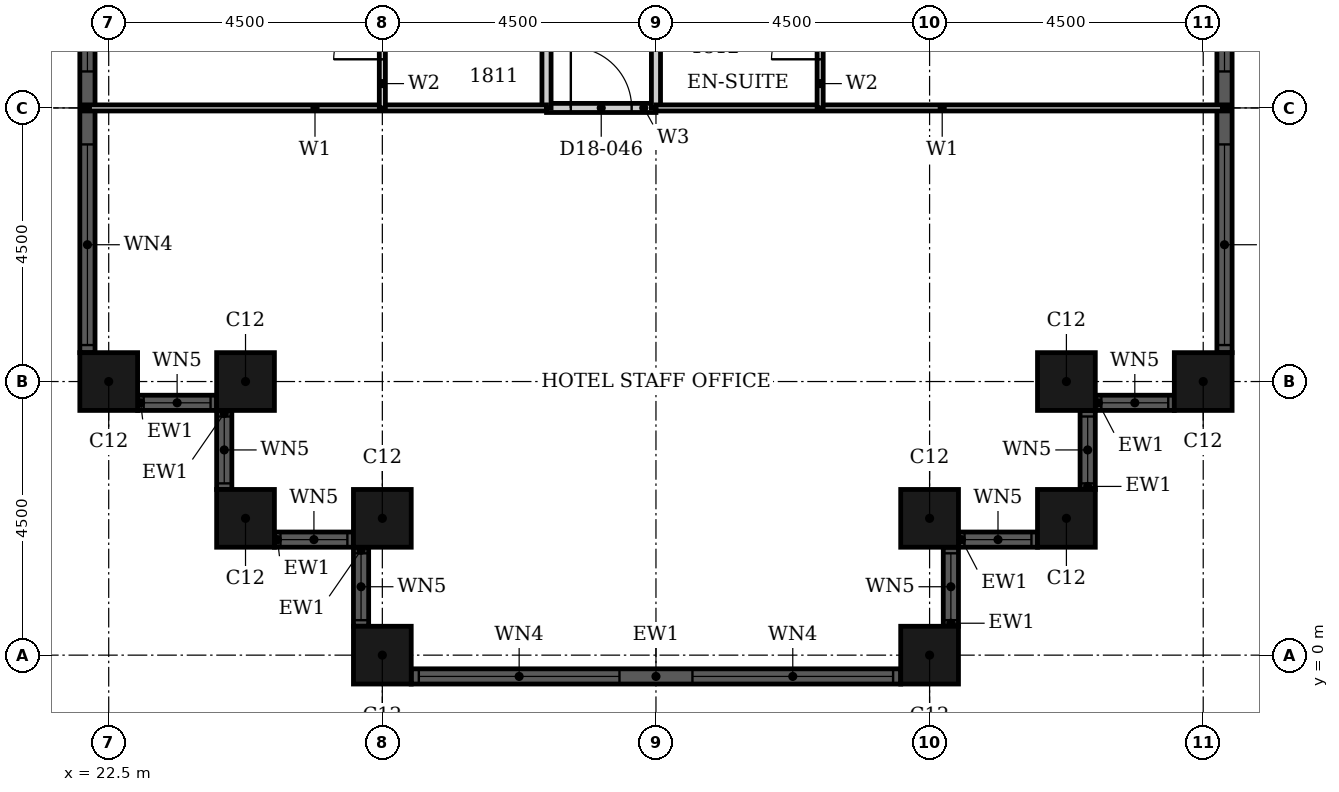
"""IFC4 building model, lengths in metres.
Left out: names, types, materials, properties, quantities, classifications, styles, units other than length and angle.
Written with IfcOpenShell. Run it as: python <this file> out.ifc"""

import sys

from ifc_helpers import new_model, si_unit, direction, frame, frame_2d, origin, origin_2d, place, context, subcontext, project, spatial, rectangle, hollow_rectangle, extrude, element, fill, save


model = new_model("IFC4")
c1 = context("Model", 3, precision=1e-05, world=origin(), true_north=direction((0.0, 1.0)))
c2 = subcontext(c1, "Body", "Model", "MODEL_VIEW")
j1 = project(units=[si_unit("LENGTHUNIT", "METRE"), si_unit("PLANEANGLEUNIT", "RADIAN")], contexts=[c1])
p1 = place(None, origin())
s1 = spatial("IfcSite", under=j1, at=p1, CompositionType="ELEMENT")
p2 = place(p1, origin())
s2 = spatial("IfcBuilding", under=s1, at=p2, CompositionType="ELEMENT")
p3 = place(p2, frame((0.0, 0.0, 78.0)))
s3 = spatial("IfcBuildingStorey", under=s2, at=p3, CompositionType="ELEMENT", Elevation=78.0)
for number, where, z_axis, x_axis in (
    (1, (22.5, 4.5, 0.0), (0.0, 0.0, 1.0), (1.0, 0.0, 0.0)),
    (2, (24.75, 4.5, 0.0), (0.0, 0.0, 1.0), (1.0, 0.0, 0.0)),
    (3, (24.75, 2.25, 0.0), (0.0, 0.0, 1.0), (1.0, 0.0, 0.0)),
    (4, (27.0, 2.25, 0.0), (0.0, 0.0, 1.0), (1.0, 0.0, 0.0)),
    (5, (27.0, 0.0, 0.0), (0.0, 0.0, 1.0), (1.0, 0.0, 0.0)),
    (6, (36.0, 0.0, 0.0), (0.0, 0.0, 1.0), (1.0, 0.0, 0.0)),
    (7, (36.0, 2.25, 0.0), (0.0, 0.0, 1.0), (1.0, 0.0, 0.0)),
    (8, (38.25, 2.25, 0.0), (0.0, 0.0, 1.0), (1.0, 0.0, 0.0)),
    (9, (38.25, 4.5, 0.0), (0.0, 0.0, 1.0), (1.0, 0.0, 0.0)),
    (10, (40.5, 4.5, 0.0), (0.0, 0.0, 1.0), (1.0, 0.0, 0.0)),
):
    element("IfcColumn", number, at=place(p3, frame(where, z_axis=z_axis, x_axis=x_axis)), inside=s3, PredefinedType="COLUMN", context=c2, shape_type="SweptSolid", body=[
        extrude(hollow_rectangle(XDim=0.95, YDim=0.95, WallThickness=0.03, at=origin_2d()), origin(), (0.0, 0.0, 1.0), 3.6),
    ])
p4 = place(p3, frame((22.975, 4.15, 0.0), z_axis=(0.0, 0.0, 1.0), x_axis=(1.0, 0.0, 0.0)))
e11 = element("IfcWall", 11, at=p4, inside=s3, PredefinedType="SOLIDWALL", context=c2, shape_type="SweptSolid", body=[
    extrude(rectangle(XDim=1.3, YDim=0.25, at=frame_2d((0.65, 0.0))), origin(), (0.0, 0.0, 1.0), 3.6),
])
p5 = place(p4, frame((0.1, 0.0, 0.9)))
e12 = element("IfcOpeningElement", 12, at=p5, cuts=e11, PredefinedType="OPENING", context=c2, shape_type="SweptSolid", body=[
    extrude(rectangle(XDim=1.1, YDim=2.08, at=frame_2d((0.55, 1.04))), frame((0.0, 0.135, 0.0), z_axis=(0.0, -1.0, 0.0), x_axis=(1.0, 0.0, 0.0)), (0.0, 0.0, 1.0), 0.27),
])
p6 = place(p3, frame((24.4, 4.025, 0.0), z_axis=(0.0, 0.0, 1.0), x_axis=(0.0, -1.0, 0.0)))
e13 = element("IfcWall", 13, at=p6, inside=s3, PredefinedType="SOLIDWALL", context=c2, shape_type="SweptSolid", body=[
    extrude(rectangle(XDim=1.3, YDim=0.25, at=frame_2d((0.65, 0.0))), origin(), (0.0, 0.0, 1.0), 3.6),
])
p7 = place(p6, frame((0.1, 0.0, 0.9)))
e14 = element("IfcOpeningElement", 14, at=p7, cuts=e13, PredefinedType="OPENING", context=c2, shape_type="SweptSolid", body=[
    extrude(rectangle(XDim=1.1, YDim=2.08, at=frame_2d((0.55, 1.04))), frame((0.0, 0.135, 0.0), z_axis=(0.0, -1.0, 0.0), x_axis=(1.0, 0.0, 0.0)), (0.0, 0.0, 1.0), 0.27),
])
p8 = place(p3, frame((25.225, 1.9, 0.0), z_axis=(0.0, 0.0, 1.0), x_axis=(1.0, 0.0, 0.0)))
e15 = element("IfcWall", 15, at=p8, inside=s3, PredefinedType="SOLIDWALL", context=c2, shape_type="SweptSolid", body=[
    extrude(rectangle(XDim=1.3, YDim=0.25, at=frame_2d((0.65, 0.0))), origin(), (0.0, 0.0, 1.0), 3.6),
])
p9 = place(p8, frame((0.1, 0.0, 0.9)))
e16 = element("IfcOpeningElement", 16, at=p9, cuts=e15, PredefinedType="OPENING", context=c2, shape_type="SweptSolid", body=[
    extrude(rectangle(XDim=1.1, YDim=2.08, at=frame_2d((0.55, 1.04))), frame((0.0, 0.135, 0.0), z_axis=(0.0, -1.0, 0.0), x_axis=(1.0, 0.0, 0.0)), (0.0, 0.0, 1.0), 0.27),
])
p10 = place(p3, frame((26.65, 1.775, 0.0), z_axis=(0.0, 0.0, 1.0), x_axis=(0.0, -1.0, 0.0)))
e17 = element("IfcWall", 17, at=p10, inside=s3, PredefinedType="SOLIDWALL", context=c2, shape_type="SweptSolid", body=[
    extrude(rectangle(XDim=1.3, YDim=0.25, at=frame_2d((0.65, 0.0))), origin(), (0.0, 0.0, 1.0), 3.6),
])
p11 = place(p10, frame((0.1, 0.0, 0.9)))
e18 = element("IfcOpeningElement", 18, at=p11, cuts=e17, PredefinedType="OPENING", context=c2, shape_type="SweptSolid", body=[
    extrude(rectangle(XDim=1.1, YDim=2.08, at=frame_2d((0.55, 1.04))), frame((0.0, 0.135, 0.0), z_axis=(0.0, -1.0, 0.0), x_axis=(1.0, 0.0, 0.0)), (0.0, 0.0, 1.0), 0.27),
])
p12 = place(p3, frame((27.475, -0.35, 0.0), z_axis=(0.0, 0.0, 1.0), x_axis=(1.0, 0.0, 0.0)))
e19 = element("IfcWall", 19, at=p12, inside=s3, PredefinedType="SOLIDWALL", context=c2, shape_type="SweptSolid", body=[
    extrude(rectangle(XDim=8.05, YDim=0.25, at=frame_2d((4.025, 0.0))), origin(), (0.0, 0.0, 1.0), 3.6),
])
p13 = place(p12, frame((0.125, 0.0, 0.9)))
e20 = element("IfcOpeningElement", 20, at=p13, cuts=e19, PredefinedType="OPENING", context=c2, shape_type="SweptSolid", body=[
    extrude(rectangle(XDim=3.3, YDim=2.08, at=frame_2d((1.65, 1.04))), frame((0.0, 0.135, 0.0), z_axis=(0.0, -1.0, 0.0), x_axis=(1.0, 0.0, 0.0)), (0.0, 0.0, 1.0), 0.27),
])
p14 = place(p12, frame((4.625, 0.0, 0.9)))
e21 = element("IfcOpeningElement", 21, at=p14, cuts=e19, PredefinedType="OPENING", context=c2, shape_type="SweptSolid", body=[
    extrude(rectangle(XDim=3.3, YDim=2.08, at=frame_2d((1.65, 1.04))), frame((0.0, 0.135, 0.0), z_axis=(0.0, -1.0, 0.0), x_axis=(1.0, 0.0, 0.0)), (0.0, 0.0, 1.0), 0.27),
])
p15 = place(p3, frame((36.35, 0.475, 0.0), z_axis=(0.0, 0.0, 1.0), x_axis=(0.0, 1.0, 0.0)))
e22 = element("IfcWall", 22, at=p15, inside=s3, PredefinedType="SOLIDWALL", context=c2, shape_type="SweptSolid", body=[
    extrude(rectangle(XDim=1.3, YDim=0.25, at=frame_2d((0.65, 0.0))), origin(), (0.0, 0.0, 1.0), 3.6),
])
p16 = place(p15, frame((0.1, 0.0, 0.9)))
e23 = element("IfcOpeningElement", 23, at=p16, cuts=e22, PredefinedType="OPENING", context=c2, shape_type="SweptSolid", body=[
    extrude(rectangle(XDim=1.1, YDim=2.08, at=frame_2d((0.55, 1.04))), frame((0.0, 0.135, 0.0), z_axis=(0.0, -1.0, 0.0), x_axis=(1.0, 0.0, 0.0)), (0.0, 0.0, 1.0), 0.27),
])
p17 = place(p3, frame((36.475, 1.9, 0.0), z_axis=(0.0, 0.0, 1.0), x_axis=(1.0, 0.0, 0.0)))
e24 = element("IfcWall", 24, at=p17, inside=s3, PredefinedType="SOLIDWALL", context=c2, shape_type="SweptSolid", body=[
    extrude(rectangle(XDim=1.3, YDim=0.25, at=frame_2d((0.65, 0.0))), origin(), (0.0, 0.0, 1.0), 3.6),
])
p18 = place(p17, frame((0.1, 0.0, 0.9)))
e25 = element("IfcOpeningElement", 25, at=p18, cuts=e24, PredefinedType="OPENING", context=c2, shape_type="SweptSolid", body=[
    extrude(rectangle(XDim=1.1, YDim=2.08, at=frame_2d((0.55, 1.04))), frame((0.0, 0.135, 0.0), z_axis=(0.0, -1.0, 0.0), x_axis=(1.0, 0.0, 0.0)), (0.0, 0.0, 1.0), 0.27),
])
p19 = place(p3, frame((38.6, 2.725, 0.0), z_axis=(0.0, 0.0, 1.0), x_axis=(0.0, 1.0, 0.0)))
e26 = element("IfcWall", 26, at=p19, inside=s3, PredefinedType="SOLIDWALL", context=c2, shape_type="SweptSolid", body=[
    extrude(rectangle(XDim=1.3, YDim=0.25, at=frame_2d((0.65, 0.0))), origin(), (0.0, 0.0, 1.0), 3.6),
])
p20 = place(p19, frame((0.1, 0.0, 0.9)))
e27 = element("IfcOpeningElement", 27, at=p20, cuts=e26, PredefinedType="OPENING", context=c2, shape_type="SweptSolid", body=[
    extrude(rectangle(XDim=1.1, YDim=2.08, at=frame_2d((0.55, 1.04))), frame((0.0, 0.135, 0.0), z_axis=(0.0, -1.0, 0.0), x_axis=(1.0, 0.0, 0.0)), (0.0, 0.0, 1.0), 0.27),
])
p21 = place(p3, frame((38.725, 4.15, 0.0), z_axis=(0.0, 0.0, 1.0), x_axis=(1.0, 0.0, 0.0)))
e28 = element("IfcWall", 28, at=p21, inside=s3, PredefinedType="SOLIDWALL", context=c2, shape_type="SweptSolid", body=[
    extrude(rectangle(XDim=1.3, YDim=0.25, at=frame_2d((0.65, 0.0))), origin(), (0.0, 0.0, 1.0), 3.6),
])
p22 = place(p21, frame((0.1, 0.0, 0.9)))
e29 = element("IfcOpeningElement", 29, at=p22, cuts=e28, PredefinedType="OPENING", context=c2, shape_type="SweptSolid", body=[
    extrude(rectangle(XDim=1.1, YDim=2.08, at=frame_2d((0.55, 1.04))), frame((0.0, 0.135, 0.0), z_axis=(0.0, -1.0, 0.0), x_axis=(1.0, 0.0, 0.0)), (0.0, 0.0, 1.0), 0.27),
])
p23 = place(p3, frame((40.85, 4.975, 0.0), z_axis=(0.0, 0.0, 1.0), x_axis=(0.0, 1.0, 0.0)))
e30 = element("IfcWall", 30, at=p23, inside=s3, PredefinedType="SOLIDWALL", context=c2, shape_type="SweptSolid", body=[
    extrude(rectangle(XDim=8.05, YDim=0.25, at=frame_2d((4.025, 0.0))), origin(), (0.0, 0.0, 1.0), 3.6),
])
p24 = place(p23, frame((0.125, 0.0, 0.9)))
e31 = element("IfcOpeningElement", 31, at=p24, cuts=e30, PredefinedType="OPENING", context=c2, shape_type="SweptSolid", body=[
    extrude(rectangle(XDim=3.3, YDim=2.08, at=frame_2d((1.65, 1.04))), frame((0.0, 0.135, 0.0), z_axis=(0.0, -1.0, 0.0), x_axis=(1.0, 0.0, 0.0)), (0.0, 0.0, 1.0), 0.27),
])
p25 = place(p23, frame((4.625, 0.0, 0.9)))
e32 = element("IfcOpeningElement", 32, at=p25, cuts=e30, PredefinedType="OPENING", context=c2, shape_type="SweptSolid", body=[
    extrude(rectangle(XDim=3.3, YDim=2.08, at=frame_2d((1.65, 1.04))), frame((0.0, 0.135, 0.0), z_axis=(0.0, -1.0, 0.0), x_axis=(1.0, 0.0, 0.0)), (0.0, 0.0, 1.0), 0.27),
])
p26 = place(p3, frame((22.15, 13.025, 0.0), z_axis=(0.0, 0.0, 1.0), x_axis=(0.0, -1.0, 0.0)))
e33 = element("IfcWall", 33, at=p26, inside=s3, PredefinedType="SOLIDWALL", context=c2, shape_type="SweptSolid", body=[
    extrude(rectangle(XDim=8.05, YDim=0.25, at=frame_2d((4.025, 0.0))), origin(), (0.0, 0.0, 1.0), 3.6),
])
p27 = place(p26, frame((0.125, 0.0, 0.9)))
e34 = element("IfcOpeningElement", 34, at=p27, cuts=e33, PredefinedType="OPENING", context=c2, shape_type="SweptSolid", body=[
    extrude(rectangle(XDim=3.3, YDim=2.08, at=frame_2d((1.65, 1.04))), frame((0.0, 0.135, 0.0), z_axis=(0.0, -1.0, 0.0), x_axis=(1.0, 0.0, 0.0)), (0.0, 0.0, 1.0), 0.27),
])
p28 = place(p26, frame((4.625, 0.0, 0.9)))
e35 = element("IfcOpeningElement", 35, at=p28, cuts=e33, PredefinedType="OPENING", context=c2, shape_type="SweptSolid", body=[
    extrude(rectangle(XDim=3.3, YDim=2.08, at=frame_2d((1.65, 1.04))), frame((0.0, 0.135, 0.0), z_axis=(0.0, -1.0, 0.0), x_axis=(1.0, 0.0, 0.0)), (0.0, 0.0, 1.0), 0.27),
])
p29 = place(p3, frame((29.7, 9.0, 0.0), z_axis=(0.0, 0.0, 1.0), x_axis=(1.0, 0.0, 0.0)))
e36 = element("IfcWall", 36, at=p29, inside=s3, PredefinedType="PARTITIONING", context=c2, shape_type="SweptSolid", body=[
    extrude(rectangle(XDim=1.8, YDim=0.15, at=frame_2d((0.9, 0.0))), origin(), (0.0, 0.0, 1.0), 3.3),
])
p30 = place(p29, frame((0.4, 0.0, 0.0)))
e37 = element("IfcOpeningElement", 37, at=p30, cuts=e36, PredefinedType="OPENING", context=c2, shape_type="SweptSolid", body=[
    extrude(rectangle(XDim=1.0, YDim=2.1, at=frame_2d((0.5, 1.05))), frame((0.0, 0.085, 0.0), z_axis=(0.0, -1.0, 0.0), x_axis=(1.0, 0.0, 0.0)), (0.0, 0.0, 1.0), 0.17),
])
p31 = place(p3, frame((29.7, 9.0, 0.0), z_axis=(0.0, 0.0, 1.0), x_axis=(0.0, 1.0, 0.0)))
e38 = element("IfcWall", 38, at=p31, inside=s3, PredefinedType="PARTITIONING", context=c2, shape_type="SweptSolid", body=[
    extrude(rectangle(XDim=11.7, YDim=0.15, at=frame_2d((5.85, 0.0))), origin(), (0.0, 0.0, 1.0), 3.3),
])
p32 = place(p31, frame((2.95, 0.0, 0.0)))
e39 = element("IfcOpeningElement", 39, at=p32, cuts=e38, PredefinedType="OPENING", context=c2, shape_type="SweptSolid", body=[
    extrude(rectangle(XDim=1.0, YDim=2.1, at=frame_2d((0.5, 1.05))), frame((0.0, 0.085, 0.0), z_axis=(0.0, -1.0, 0.0), x_axis=(1.0, 0.0, 0.0)), (0.0, 0.0, 1.0), 0.17),
])
p33 = place(p3, frame((31.5, 9.0, 0.0), z_axis=(0.0, 0.0, 1.0), x_axis=(0.0, 1.0, 0.0)))
e40 = element("IfcWall", 40, at=p33, inside=s3, PredefinedType="PARTITIONING", context=c2, shape_type="SweptSolid", body=[
    extrude(rectangle(XDim=11.7, YDim=0.15, at=frame_2d((5.85, 0.0))), origin(), (0.0, 0.0, 1.0), 2.58),
])
p34 = place(p33, frame((2.95, 0.0, 0.0)))
e41 = element("IfcOpeningElement", 41, at=p34, cuts=e40, PredefinedType="OPENING", context=c2, shape_type="SweptSolid", body=[
    extrude(rectangle(XDim=1.0, YDim=2.1, at=frame_2d((0.5, 1.05))), frame((0.0, 0.085, 0.0), z_axis=(0.0, -1.0, 0.0), x_axis=(1.0, 0.0, 0.0)), (0.0, 0.0, 1.0), 0.17),
])
p35 = place(p3, frame((31.5, 9.0, 0.0), z_axis=(0.0, 0.0, 1.0), x_axis=(1.0, 0.0, 0.0)))
e42 = element("IfcWall", 42, at=p35, inside=s3, PredefinedType="PARTITIONING", context=c2, shape_type="SweptSolid", body=[
    extrude(rectangle(XDim=9.415, YDim=0.1, at=frame_2d((4.708, 0.0))), origin(), (0.0, 0.0, 1.0), 3.3),
])
p36 = place(p3, frame((22.085, 9.0, 0.0), z_axis=(0.0, 0.0, 1.0), x_axis=(1.0, 0.0, 0.0)))
e43 = element("IfcWall", 43, at=p36, inside=s3, PredefinedType="PARTITIONING", context=c2, shape_type="SweptSolid", body=[
    extrude(rectangle(XDim=7.615, YDim=0.1, at=frame_2d((3.808, 0.0))), origin(), (0.0, 0.0, 1.0), 3.3),
])
p37 = place(p3, frame((27.0, 9.0, 0.0), z_axis=(0.0, 0.0, 1.0), x_axis=(0.0, 1.0, 0.0)))
e44 = element("IfcWall", 44, at=p37, inside=s3, PredefinedType="PARTITIONING", context=c2, shape_type="SweptSolid", body=[
    extrude(rectangle(XDim=2.4, YDim=0.1, at=frame_2d((1.2, 0.0))), origin(), (0.0, 0.0, 1.0), 2.58),
])
p38 = place(p37, frame((0.8, 0.0, 0.0)))
e45 = element("IfcOpeningElement", 45, at=p38, cuts=e44, PredefinedType="OPENING", context=c2, shape_type="SweptSolid", body=[
    extrude(rectangle(XDim=0.8, YDim=2.1, at=frame_2d((0.4, 1.05))), frame((0.0, 0.06, 0.0), z_axis=(0.0, -1.0, 0.0), x_axis=(1.0, 0.0, 0.0)), (0.0, 0.0, 1.0), 0.12),
])
p39 = place(p3, frame((34.2, 9.0, 0.0), z_axis=(0.0, 0.0, 1.0), x_axis=(0.0, 1.0, 0.0)))
e46 = element("IfcWall", 46, at=p39, inside=s3, PredefinedType="PARTITIONING", context=c2, shape_type="SweptSolid", body=[
    extrude(rectangle(XDim=2.4, YDim=0.1, at=frame_2d((1.2, 0.0))), origin(), (0.0, 0.0, 1.0), 3.3),
])
p40 = place(p39, frame((0.8, 0.0, 0.0)))
e47 = element("IfcOpeningElement", 47, at=p40, cuts=e46, PredefinedType="OPENING", context=c2, shape_type="SweptSolid", body=[
    extrude(rectangle(XDim=0.8, YDim=2.1, at=frame_2d((0.4, 1.05))), frame((0.0, 0.06, 0.0), z_axis=(0.0, -1.0, 0.0), x_axis=(1.0, 0.0, 0.0)), (0.0, 0.0, 1.0), 0.12),
])
p41 = place(p5, origin())
e48 = element("IfcWindow", 48, at=p41, inside=s3, PartitioningType="SINGLE_PANEL", PredefinedType="WINDOW", context=c2, shape_type="SweptSolid", body=[
    extrude(rectangle(XDim=1.1, YDim=2.08, at=frame_2d((0.55, 1.04))), frame((0.0, 0.03, 0.0), z_axis=(0.0, -1.0, 0.0), x_axis=(1.0, 0.0, 0.0)), (0.0, 0.0, 1.0), 0.06),
])
fill(e12, e48)
p42 = place(p7, origin())
e49 = element("IfcWindow", 49, at=p42, inside=s3, PartitioningType="SINGLE_PANEL", PredefinedType="WINDOW", context=c2, shape_type="SweptSolid", body=[
    extrude(rectangle(XDim=1.1, YDim=2.08, at=frame_2d((0.55, 1.04))), frame((0.0, 0.03, 0.0), z_axis=(0.0, -1.0, 0.0), x_axis=(1.0, 0.0, 0.0)), (0.0, 0.0, 1.0), 0.06),
])
fill(e14, e49)
p43 = place(p9, origin())
e50 = element("IfcWindow", 50, at=p43, inside=s3, PartitioningType="SINGLE_PANEL", PredefinedType="WINDOW", context=c2, shape_type="SweptSolid", body=[
    extrude(rectangle(XDim=1.1, YDim=2.08, at=frame_2d((0.55, 1.04))), frame((0.0, 0.03, 0.0), z_axis=(0.0, -1.0, 0.0), x_axis=(1.0, 0.0, 0.0)), (0.0, 0.0, 1.0), 0.06),
])
fill(e16, e50)
p44 = place(p11, origin())
e51 = element("IfcWindow", 51, at=p44, inside=s3, PartitioningType="SINGLE_PANEL", PredefinedType="WINDOW", context=c2, shape_type="SweptSolid", body=[
    extrude(rectangle(XDim=1.1, YDim=2.08, at=frame_2d((0.55, 1.04))), frame((0.0, 0.03, 0.0), z_axis=(0.0, -1.0, 0.0), x_axis=(1.0, 0.0, 0.0)), (0.0, 0.0, 1.0), 0.06),
])
fill(e18, e51)
p45 = place(p13, origin())
e52 = element("IfcWindow", 52, at=p45, inside=s3, PartitioningType="SINGLE_PANEL", PredefinedType="WINDOW", context=c2, shape_type="SweptSolid", body=[
    extrude(rectangle(XDim=3.3, YDim=2.08, at=frame_2d((1.65, 1.04))), frame((0.0, 0.03, 0.0), z_axis=(0.0, -1.0, 0.0), x_axis=(1.0, 0.0, 0.0)), (0.0, 0.0, 1.0), 0.06),
])
fill(e20, e52)
p46 = place(p14, origin())
e53 = element("IfcWindow", 53, at=p46, inside=s3, PartitioningType="SINGLE_PANEL", PredefinedType="WINDOW", context=c2, shape_type="SweptSolid", body=[
    extrude(rectangle(XDim=3.3, YDim=2.08, at=frame_2d((1.65, 1.04))), frame((0.0, 0.03, 0.0), z_axis=(0.0, -1.0, 0.0), x_axis=(1.0, 0.0, 0.0)), (0.0, 0.0, 1.0), 0.06),
])
fill(e21, e53)
p47 = place(p16, origin())
e54 = element("IfcWindow", 54, at=p47, inside=s3, PartitioningType="SINGLE_PANEL", PredefinedType="WINDOW", context=c2, shape_type="SweptSolid", body=[
    extrude(rectangle(XDim=1.1, YDim=2.08, at=frame_2d((0.55, 1.04))), frame((0.0, 0.03, 0.0), z_axis=(0.0, -1.0, 0.0), x_axis=(1.0, 0.0, 0.0)), (0.0, 0.0, 1.0), 0.06),
])
fill(e23, e54)
p48 = place(p18, origin())
e55 = element("IfcWindow", 55, at=p48, inside=s3, PartitioningType="SINGLE_PANEL", PredefinedType="WINDOW", context=c2, shape_type="SweptSolid", body=[
    extrude(rectangle(XDim=1.1, YDim=2.08, at=frame_2d((0.55, 1.04))), frame((0.0, 0.03, 0.0), z_axis=(0.0, -1.0, 0.0), x_axis=(1.0, 0.0, 0.0)), (0.0, 0.0, 1.0), 0.06),
])
fill(e25, e55)
p49 = place(p20, origin())
e56 = element("IfcWindow", 56, at=p49, inside=s3, PartitioningType="SINGLE_PANEL", PredefinedType="WINDOW", context=c2, shape_type="SweptSolid", body=[
    extrude(rectangle(XDim=1.1, YDim=2.08, at=frame_2d((0.55, 1.04))), frame((0.0, 0.03, 0.0), z_axis=(0.0, -1.0, 0.0), x_axis=(1.0, 0.0, 0.0)), (0.0, 0.0, 1.0), 0.06),
])
fill(e27, e56)
p50 = place(p22, origin())
e57 = element("IfcWindow", 57, at=p50, inside=s3, PartitioningType="SINGLE_PANEL", PredefinedType="WINDOW", context=c2, shape_type="SweptSolid", body=[
    extrude(rectangle(XDim=1.1, YDim=2.08, at=frame_2d((0.55, 1.04))), frame((0.0, 0.03, 0.0), z_axis=(0.0, -1.0, 0.0), x_axis=(1.0, 0.0, 0.0)), (0.0, 0.0, 1.0), 0.06),
])
fill(e29, e57)
p51 = place(p24, origin())
e58 = element("IfcWindow", 58, at=p51, inside=s3, PartitioningType="SINGLE_PANEL", PredefinedType="WINDOW", context=c2, shape_type="SweptSolid", body=[
    extrude(rectangle(XDim=3.3, YDim=2.08, at=frame_2d((1.65, 1.04))), frame((0.0, 0.03, 0.0), z_axis=(0.0, -1.0, 0.0), x_axis=(1.0, 0.0, 0.0)), (0.0, 0.0, 1.0), 0.06),
])
fill(e31, e58)
p52 = place(p25, origin())
e59 = element("IfcWindow", 59, at=p52, inside=s3, PartitioningType="SINGLE_PANEL", PredefinedType="WINDOW", context=c2, shape_type="SweptSolid", body=[
    extrude(rectangle(XDim=3.3, YDim=2.08, at=frame_2d((1.65, 1.04))), frame((0.0, 0.03, 0.0), z_axis=(0.0, -1.0, 0.0), x_axis=(1.0, 0.0, 0.0)), (0.0, 0.0, 1.0), 0.06),
])
fill(e32, e59)
p53 = place(p27, origin())
e60 = element("IfcWindow", 60, at=p53, inside=s3, PartitioningType="SINGLE_PANEL", PredefinedType="WINDOW", context=c2, shape_type="SweptSolid", body=[
    extrude(rectangle(XDim=3.3, YDim=2.08, at=frame_2d((1.65, 1.04))), frame((0.0, 0.03, 0.0), z_axis=(0.0, -1.0, 0.0), x_axis=(1.0, 0.0, 0.0)), (0.0, 0.0, 1.0), 0.06),
])
fill(e34, e60)
p54 = place(p28, origin())
e61 = element("IfcWindow", 61, at=p54, inside=s3, PartitioningType="SINGLE_PANEL", PredefinedType="WINDOW", context=c2, shape_type="SweptSolid", body=[
    extrude(rectangle(XDim=3.3, YDim=2.08, at=frame_2d((1.65, 1.04))), frame((0.0, 0.03, 0.0), z_axis=(0.0, -1.0, 0.0), x_axis=(1.0, 0.0, 0.0)), (0.0, 0.0, 1.0), 0.06),
])
fill(e35, e61)
p55 = place(p38, origin())
e62 = element("IfcDoor", 62, at=p55, inside=s3, OperationType="SINGLE_SWING_LEFT", PredefinedType="DOOR", context=c2, shape_type="SweptSolid", body=[
    extrude(rectangle(XDim=0.8, YDim=2.1, at=frame_2d((0.4, 1.05))), frame((0.0, 0.025, 0.0), z_axis=(0.0, -1.0, 0.0), x_axis=(1.0, 0.0, 0.0)), (0.0, 0.0, 1.0), 0.05),
])
fill(e45, e62)
p56 = place(p40, origin())
e63 = element("IfcDoor", 63, at=p56, inside=s3, OperationType="SINGLE_SWING_RIGHT", PredefinedType="DOOR", context=c2, shape_type="SweptSolid", body=[
    extrude(rectangle(XDim=0.8, YDim=2.1, at=frame_2d((0.4, 1.05))), frame((0.0, 0.025, 0.0), z_axis=(0.0, -1.0, 0.0), x_axis=(1.0, 0.0, 0.0)), (0.0, 0.0, 1.0), 0.05),
])
fill(e47, e63)
p57 = place(p30, origin())
e64 = element("IfcDoor", 64, at=p57, inside=s3, OperationType="SINGLE_SWING_RIGHT", PredefinedType="DOOR", context=c2, shape_type="SweptSolid", body=[
    extrude(rectangle(XDim=1.0, YDim=2.1, at=frame_2d((0.5, 1.05))), frame((0.0, 0.025, 0.0), z_axis=(0.0, -1.0, 0.0), x_axis=(1.0, 0.0, 0.0)), (0.0, 0.0, 1.0), 0.05),
])
fill(e37, e64)
save(model, sys.argv[1])
